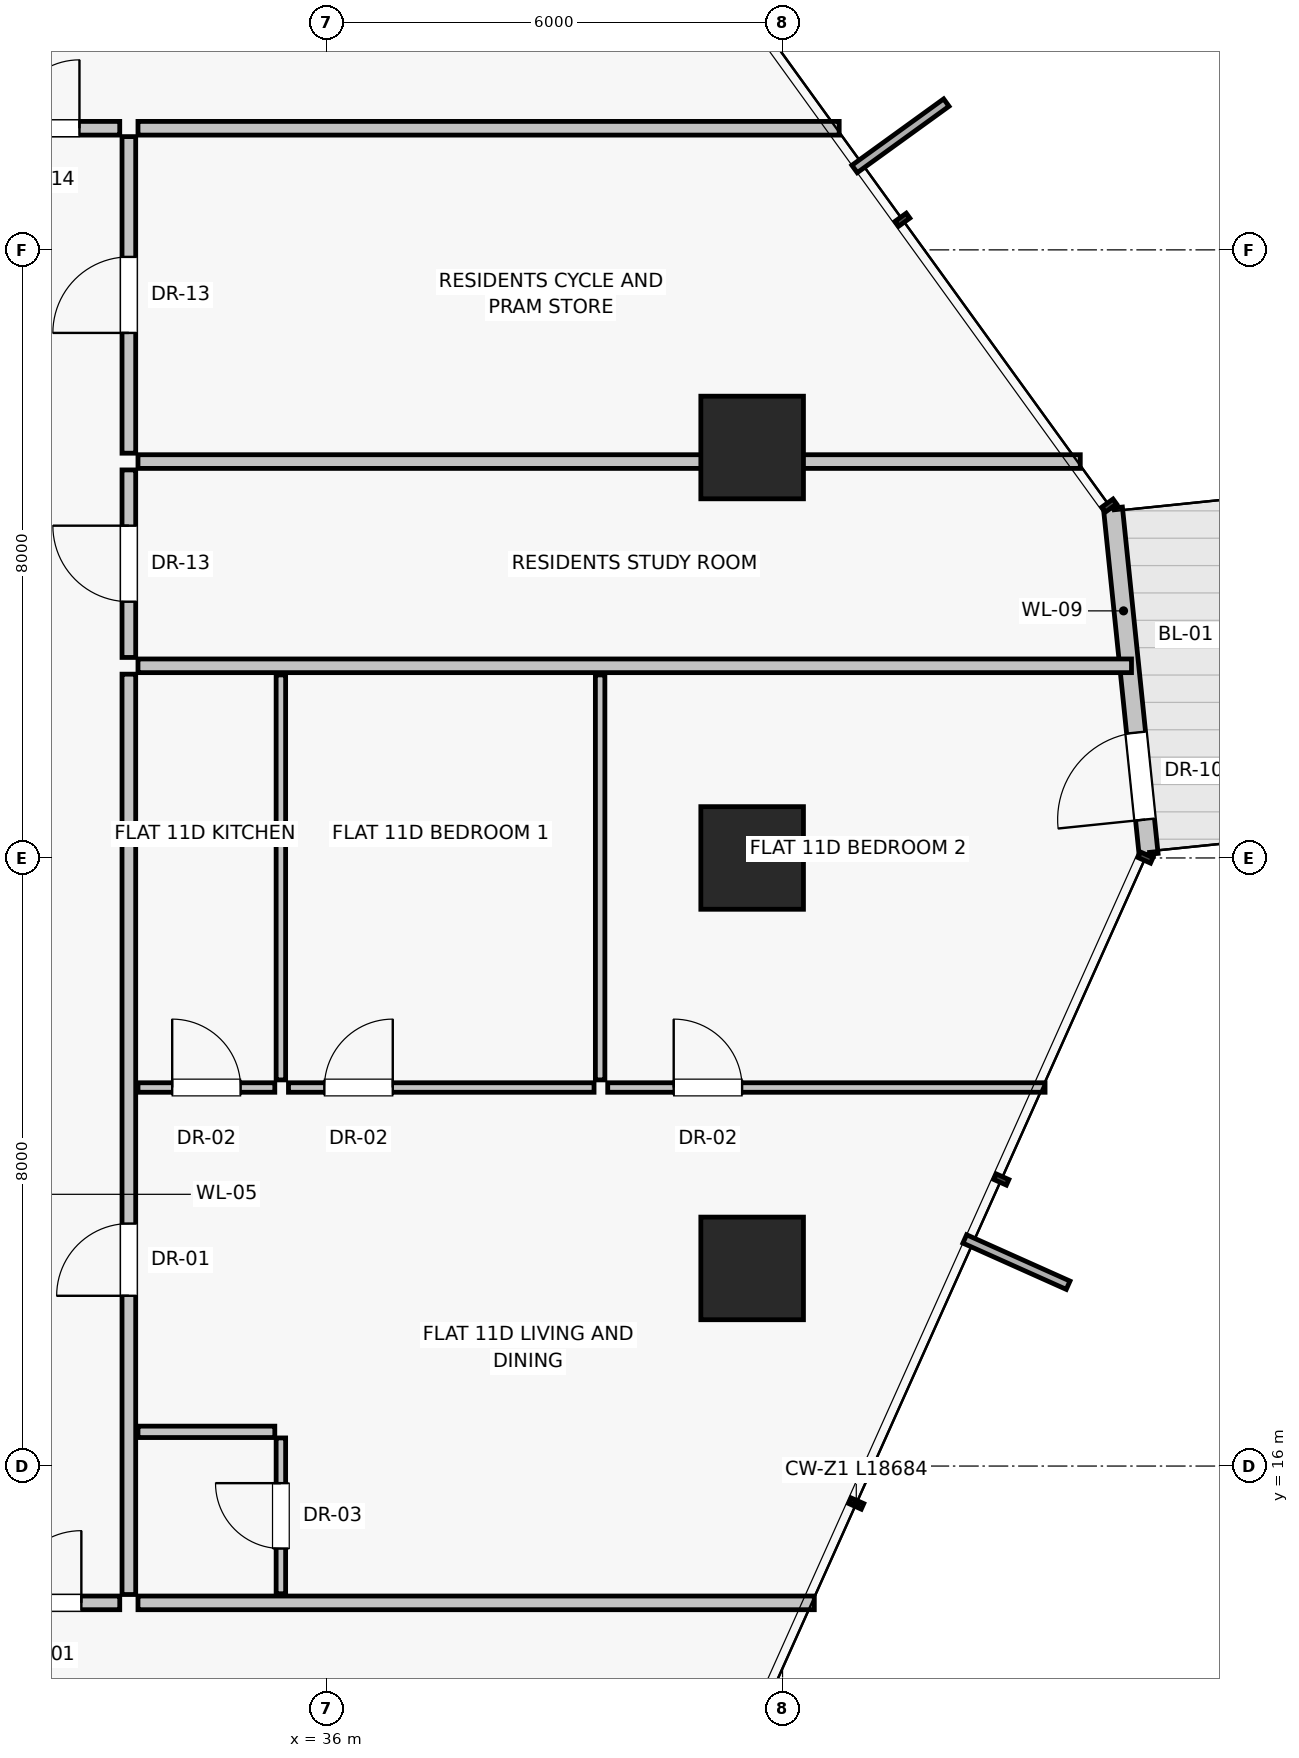
"""IFC4 building model, lengths in metres.
Left out: names, types, materials, properties, quantities, classifications, styles, units other than length and angle.
Written with IfcOpenShell. Run it as: python <this file> out.ifc"""

import sys

from ifc_helpers import new_model, si_unit, direction, frame, frame_2d, origin, origin_2d, place, context, subcontext, project, spatial, rectangle, extrude, source, transform, mapped, element, fill, save


model = new_model("IFC4")
c1 = context("Model", 3, precision=1e-05, world=origin(), true_north=direction((0.0, 1.0)))
c2 = subcontext(c1, "Body", "Model", "MODEL_VIEW")
j1 = project(units=[si_unit("LENGTHUNIT", "METRE"), si_unit("PLANEANGLEUNIT", "RADIAN")], contexts=[c1])
p1 = place(None, origin())
s1 = spatial("IfcSite", under=j1, at=p1, CompositionType="ELEMENT")
p2 = place(p1, origin())
s2 = spatial("IfcBuilding", under=s1, at=p2, CompositionType="ELEMENT")
p3 = place(p2, frame((0.0, 0.0, 43.55)))
s3 = spatial("IfcBuildingStorey", under=s2, at=p3, CompositionType="ELEMENT", Elevation=43.55)
for number, where, z_axis, x_axis in (
    (1, (41.6, 18.6, 0.0), (0.0, 0.0, 1.0), (1.0, 0.0, 0.0)),
    (2, (41.6, 24.0, 0.0), (0.0, 0.0, 1.0), (1.0, 0.0, 0.0)),
    (3, (41.6, 29.4, 0.0), (0.0, 0.0, 1.0), (1.0, 0.0, 0.0)),
):
    element("IfcColumn", number, at=place(p3, frame(where, z_axis=z_axis, x_axis=x_axis)), inside=s3, PredefinedType="COLUMN", context=c2, shape_type="SweptSolid", body=[
        extrude(rectangle(XDim=1.35, YDim=1.35, at=origin_2d()), origin(), (0.0, 0.0, 1.0), 3.25),
    ])
p4 = place(p3, frame((46.816, 24.048, 0.0), z_axis=(0.0, 0.0, 1.0), x_axis=(-0.102453567768, 0.994737787787, 0.0)))
e4 = element("IfcWall", 4, at=p4, inside=s3, PredefinedType="SOLIDWALL", context=c2, shape_type="SweptSolid", body=[
    extrude(rectangle(XDim=4.58, YDim=0.25, at=frame_2d((2.29, 0.0))), origin(), (0.0, 0.0, 1.0), 3.0),
])
p5 = place(p4, frame((0.46, 0.0, 0.0)))
e5 = element("IfcOpeningElement", 5, at=p5, cuts=e4, PredefinedType="OPENING", context=c2, shape_type="SweptSolid", body=[
    extrude(rectangle(XDim=1.15, YDim=2.25, at=frame_2d((0.575, 1.125))), frame((0.0, 0.135, 0.0), z_axis=(0.0, -1.0, 0.0), x_axis=(1.0, 0.0, 0.0)), (0.0, 0.0, 1.0), 0.27),
])
p6 = place(p3, frame((33.52, 14.2, 0.0), z_axis=(0.0, 0.0, 1.0), x_axis=(1.0, 0.0, 0.0)))
e6 = element("IfcWall", 6, at=p6, inside=s3, PredefinedType="PARTITIONING", context=c2, shape_type="SweptSolid", body=[
    extrude(rectangle(XDim=8.898, YDim=0.18, at=frame_2d((4.449, 0.0))), origin(), (0.0, 0.0, 1.0), 3.0),
])
p7 = place(p3, frame((33.52, 33.6, 0.0), z_axis=(0.0, 0.0, 1.0), x_axis=(1.0, 0.0, 0.0)))
e7 = element("IfcWall", 7, at=p7, inside=s3, PredefinedType="PARTITIONING", context=c2, shape_type="SweptSolid", body=[
    extrude(rectangle(XDim=9.225, YDim=0.18, at=frame_2d((4.613, 0.0))), origin(), (0.0, 0.0, 1.0), 3.0),
])
p8 = place(p3, frame((33.4, 14.31, 0.0), z_axis=(0.0, 0.0, 1.0), x_axis=(0.0, 1.0, 0.0)))
e8 = element("IfcWall", 8, at=p8, inside=s3, PredefinedType="PARTITIONING", context=c2, shape_type="SweptSolid", body=[
    extrude(rectangle(XDim=12.108, YDim=0.18, at=frame_2d((6.054, 0.0))), origin(), (0.0, 0.0, 1.0), 3.0),
])
p9 = place(p8, frame((3.93, 0.0, 0.0)))
e9 = element("IfcOpeningElement", 9, at=p9, cuts=e8, PredefinedType="OPENING", context=c2, shape_type="SweptSolid", body=[
    extrude(rectangle(XDim=0.95, YDim=2.02, at=frame_2d((0.475, 1.01))), frame((0.0, 0.1, 0.0), z_axis=(0.0, -1.0, 0.0), x_axis=(1.0, 0.0, 0.0)), (0.0, 0.0, 1.0), 0.2),
])
p10 = place(p3, frame((33.52, 16.45, 0.0), z_axis=(0.0, 0.0, 1.0), x_axis=(1.0, 0.0, 0.0)))
e10 = element("IfcWall", 10, at=p10, inside=s3, PredefinedType="PARTITIONING", context=c2, shape_type="SweptSolid", body=[
    extrude(rectangle(XDim=1.8, YDim=0.15, at=frame_2d((0.9, 0.0))), origin(), (0.0, 0.0, 1.0), 3.0),
])
p11 = place(p3, frame((35.4, 14.32, 0.0), z_axis=(0.0, 0.0, 1.0), x_axis=(0.0, 1.0, 0.0)))
e11 = element("IfcWall", 11, at=p11, inside=s3, PredefinedType="PARTITIONING", context=c2, shape_type="SweptSolid", body=[
    extrude(rectangle(XDim=2.05, YDim=0.125, at=frame_2d((1.025, 0.0))), origin(), (0.0, 0.0, 1.0), 3.0),
])
p12 = place(p11, frame((0.595, 0.0, 0.0)))
e12 = element("IfcOpeningElement", 12, at=p12, cuts=e11, PredefinedType="OPENING", context=c2, shape_type="SweptSolid", body=[
    extrude(rectangle(XDim=0.86, YDim=2.01, at=frame_2d((0.43, 1.005))), frame((0.0, 0.073, 0.0), z_axis=(0.0, -1.0, 0.0), x_axis=(1.0, 0.0, 0.0)), (0.0, 0.0, 1.0), 0.145),
])
p13 = place(p3, frame((33.52, 20.98, 0.0), z_axis=(0.0, 0.0, 1.0), x_axis=(1.0, 0.0, 0.0)))
e13 = element("IfcWall", 13, at=p13, inside=s3, PredefinedType="PARTITIONING", context=c2, shape_type="SweptSolid", body=[
    extrude(rectangle(XDim=1.8, YDim=0.125, at=frame_2d((0.9, 0.0))), origin(), (0.0, 0.0, 1.0), 3.0),
])
p14 = place(p13, frame((0.45, 0.0, 0.0)))
e14 = element("IfcOpeningElement", 14, at=p14, cuts=e13, PredefinedType="OPENING", context=c2, shape_type="SweptSolid", body=[
    extrude(rectangle(XDim=0.9, YDim=2.01, at=frame_2d((0.45, 1.005))), frame((0.0, 0.073, 0.0), z_axis=(0.0, -1.0, 0.0), x_axis=(1.0, 0.0, 0.0)), (0.0, 0.0, 1.0), 0.145),
])
for number, where, z_axis, x_axis in (
    (15, (35.4, 21.08, 0.0), (0.0, 0.0, 1.0), (0.0, 1.0, 0.0)),
    (16, (39.6, 21.08, 0.0), (0.0, 0.0, 1.0), (0.0, 1.0, 0.0)),
):
    element("IfcWall", number, at=place(p3, frame(where, z_axis=z_axis, x_axis=x_axis)), inside=s3, PredefinedType="PARTITIONING", context=c2, shape_type="SweptSolid", body=[
        extrude(rectangle(XDim=5.328, YDim=0.125, at=frame_2d((2.664, 0.0))), origin(), (0.0, 0.0, 1.0), 3.0),
    ])
p15 = place(p3, frame((35.5, 20.98, 0.0), z_axis=(0.0, 0.0, 1.0), x_axis=(1.0, 0.0, 0.0)))
e17 = element("IfcWall", 17, at=p15, inside=s3, PredefinedType="PARTITIONING", context=c2, shape_type="SweptSolid", body=[
    extrude(rectangle(XDim=4.02, YDim=0.125, at=frame_2d((2.01, 0.0))), origin(), (0.0, 0.0, 1.0), 3.0),
])
p16 = place(p15, frame((0.472, 0.0, 0.0)))
e18 = element("IfcOpeningElement", 18, at=p16, cuts=e17, PredefinedType="OPENING", context=c2, shape_type="SweptSolid", body=[
    extrude(rectangle(XDim=0.9, YDim=2.01, at=frame_2d((0.45, 1.005))), frame((0.0, 0.073, 0.0), z_axis=(0.0, -1.0, 0.0), x_axis=(1.0, 0.0, 0.0)), (0.0, 0.0, 1.0), 0.145),
])
p17 = place(p3, frame((39.7, 20.98, 0.0), z_axis=(0.0, 0.0, 1.0), x_axis=(1.0, 0.0, 0.0)))
e19 = element("IfcWall", 19, at=p17, inside=s3, PredefinedType="PARTITIONING", context=c2, shape_type="SweptSolid", body=[
    extrude(rectangle(XDim=5.754, YDim=0.125, at=frame_2d((2.877, 0.0))), origin(), (0.0, 0.0, 1.0), 3.0),
])
p18 = place(p17, frame((0.868, 0.0, 0.0)))
e20 = element("IfcOpeningElement", 20, at=p18, cuts=e19, PredefinedType="OPENING", context=c2, shape_type="SweptSolid", body=[
    extrude(rectangle(XDim=0.9, YDim=2.01, at=frame_2d((0.45, 1.005))), frame((0.0, 0.073, 0.0), z_axis=(0.0, -1.0, 0.0), x_axis=(1.0, 0.0, 0.0)), (0.0, 0.0, 1.0), 0.145),
])
p19 = place(p3, frame((33.52, 26.528, 0.0), z_axis=(0.0, 0.0, 1.0), x_axis=(1.0, 0.0, 0.0)))
e21 = element("IfcWall", 21, at=p19, inside=s3, PredefinedType="PARTITIONING", context=c2, shape_type="SweptSolid", body=[
    extrude(rectangle(XDim=13.071, YDim=0.18, at=frame_2d((6.535, 0.0))), origin(), (0.0, 0.0, 1.0), 3.0),
])
p20 = place(p3, frame((33.4, 26.638, 0.0), z_axis=(0.0, 0.0, 1.0), x_axis=(0.0, 1.0, 0.0)))
e22 = element("IfcWall", 22, at=p20, inside=s3, PredefinedType="PARTITIONING", context=c2, shape_type="SweptSolid", body=[
    extrude(rectangle(XDim=2.467, YDim=0.18, at=frame_2d((1.233, 0.0))), origin(), (0.0, 0.0, 1.0), 3.0),
])
p21 = place(p20, frame((0.733, 0.0, 0.0)))
e23 = element("IfcOpeningElement", 23, at=p21, cuts=e22, PredefinedType="OPENING", context=c2, shape_type="SweptSolid", body=[
    extrude(rectangle(XDim=1.0, YDim=2.01, at=frame_2d((0.5, 1.005))), frame((0.0, 0.1, 0.0), z_axis=(0.0, -1.0, 0.0), x_axis=(1.0, 0.0, 0.0)), (0.0, 0.0, 1.0), 0.2),
])
p22 = place(p3, frame((33.4, 29.325, 0.0), z_axis=(0.0, 0.0, 1.0), x_axis=(0.0, 1.0, 0.0)))
e24 = element("IfcWall", 24, at=p22, inside=s3, PredefinedType="PARTITIONING", context=c2, shape_type="SweptSolid", body=[
    extrude(rectangle(XDim=4.165, YDim=0.18, at=frame_2d((2.083, 0.0))), origin(), (0.0, 0.0, 1.0), 3.0),
])
p23 = place(p22, frame((1.583, 0.0, 0.0)))
e25 = element("IfcOpeningElement", 25, at=p23, cuts=e24, PredefinedType="OPENING", context=c2, shape_type="SweptSolid", body=[
    extrude(rectangle(XDim=1.0, YDim=2.01, at=frame_2d((0.5, 1.005))), frame((0.0, 0.1, 0.0), z_axis=(0.0, -1.0, 0.0), x_axis=(1.0, 0.0, 0.0)), (0.0, 0.0, 1.0), 0.2),
])
p24 = place(p3, frame((33.52, 29.215, 0.0), z_axis=(0.0, 0.0, 1.0), x_axis=(1.0, 0.0, 0.0)))
e26 = element("IfcWall", 26, at=p24, inside=s3, PredefinedType="PARTITIONING", context=c2, shape_type="SweptSolid", body=[
    extrude(rectangle(XDim=12.397, YDim=0.18, at=frame_2d((6.198, 0.0))), origin(), (0.0, 0.0, 1.0), 2.299),
])
p25 = place(p3, frame((31.32, 14.2, 0.0), z_axis=(0.0, 0.0, 1.0), x_axis=(1.0, 0.0, 0.0)))
e27 = element("IfcWall", 27, at=p25, inside=s3, PredefinedType="PARTITIONING", context=c2, shape_type="SweptSolid", body=[
    extrude(rectangle(XDim=1.96, YDim=0.18, at=frame_2d((0.98, 0.0))), origin(), (0.0, 0.0, 1.0), 3.0),
])
p26 = place(p25, frame((0.505, 0.0, 0.0)))
e28 = element("IfcOpeningElement", 28, at=p26, cuts=e27, PredefinedType="OPENING", context=c2, shape_type="SweptSolid", body=[
    extrude(rectangle(XDim=0.95, YDim=2.02, at=frame_2d((0.475, 1.01))), frame((0.0, 0.1, 0.0), z_axis=(0.0, -1.0, 0.0), x_axis=(1.0, 0.0, 0.0)), (0.0, 0.0, 1.0), 0.2),
])
p27 = place(p3, frame((31.32, 33.6, 0.0), z_axis=(0.0, 0.0, 1.0), x_axis=(1.0, 0.0, 0.0)))
e29 = element("IfcWall", 29, at=p27, inside=s3, PredefinedType="PARTITIONING", context=c2, shape_type="SweptSolid", body=[
    extrude(rectangle(XDim=1.96, YDim=0.18, at=frame_2d((0.98, 0.0))), origin(), (0.0, 0.0, 1.0), 3.0),
])
p28 = place(p27, frame((0.53, 0.0, 0.0)))
e30 = element("IfcOpeningElement", 30, at=p28, cuts=e29, PredefinedType="OPENING", context=c2, shape_type="SweptSolid", body=[
    extrude(rectangle(XDim=0.9, YDim=2.01, at=frame_2d((0.45, 1.005))), frame((0.0, 0.1, 0.0), z_axis=(0.0, -1.0, 0.0), x_axis=(1.0, 0.0, 0.0)), (0.0, 0.0, 1.0), 0.2),
])
m1 = source(origin(), c2, "Body", "SweptSolid", [
    extrude(rectangle(XDim=1.15, YDim=2.25, at=frame_2d((0.575, 1.125))), frame((0.0, 0.025, 0.0), z_axis=(0.0, -1.0, 0.0), x_axis=(1.0, 0.0, 0.0)), (0.0, 0.0, 1.0), 0.05),
])
p29 = place(p5, frame((1.15, 0.0, 0.0), z_axis=(0.0, 0.0, 1.0), x_axis=(-1.0, 0.0, 0.0)))
e31 = element("IfcDoor", 31, at=p29, inside=s3, OperationType="SINGLE_SWING_LEFT", PredefinedType="DOOR", context=c2, shape_type="MappedRepresentation", body=[
    mapped(m1, transform((0.0, 0.0, 0.0), scale=1.0)),
])
fill(e5, e31)
m2 = source(origin(), c2, "Body", "SweptSolid", [
    extrude(rectangle(XDim=0.95, YDim=2.02, at=frame_2d((0.475, 1.01))), frame((0.0, 0.025, 0.0), z_axis=(0.0, -1.0, 0.0), x_axis=(1.0, 0.0, 0.0)), (0.0, 0.0, 1.0), 0.05),
])
p30 = place(p9, origin())
e32 = element("IfcDoor", 32, at=p30, inside=s3, OperationType="SINGLE_SWING_LEFT", PredefinedType="DOOR", context=c2, shape_type="MappedRepresentation", body=[
    mapped(m2, transform((0.0, 0.0, 0.0), scale=1.0)),
])
fill(e9, e32)
m3 = source(origin(), c2, "Body", "SweptSolid", [
    extrude(rectangle(XDim=0.86, YDim=2.01, at=frame_2d((0.43, 1.005))), frame((0.0, 0.025, 0.0), z_axis=(0.0, -1.0, 0.0), x_axis=(1.0, 0.0, 0.0)), (0.0, 0.0, 1.0), 0.05),
])
p31 = place(p12, origin())
e33 = element("IfcDoor", 33, at=p31, inside=s3, OperationType="SINGLE_SWING_RIGHT", PredefinedType="DOOR", context=c2, shape_type="MappedRepresentation", body=[
    mapped(m3, transform((0.0, 0.0, 0.0), scale=1.0)),
])
fill(e12, e33)
m4 = source(origin(), c2, "Body", "SweptSolid", [
    extrude(rectangle(XDim=0.9, YDim=2.01, at=frame_2d((0.45, 1.005))), frame((0.0, 0.025, 0.0), z_axis=(0.0, -1.0, 0.0), x_axis=(1.0, 0.0, 0.0)), (0.0, 0.0, 1.0), 0.05),
])
p32 = place(p14, origin())
e34 = element("IfcDoor", 34, at=p32, inside=s3, OperationType="SINGLE_SWING_LEFT", PredefinedType="DOOR", context=c2, shape_type="MappedRepresentation", body=[
    mapped(m4, transform((0.0, 0.0, 0.0), scale=1.0)),
])
fill(e14, e34)
p33 = place(p16, origin())
e35 = element("IfcDoor", 35, at=p33, inside=s3, OperationType="SINGLE_SWING_RIGHT", PredefinedType="DOOR", context=c2, shape_type="MappedRepresentation", body=[
    mapped(m4, transform((0.0, 0.0, 0.0), scale=1.0)),
])
fill(e18, e35)
p34 = place(p18, origin())
e36 = element("IfcDoor", 36, at=p34, inside=s3, OperationType="SINGLE_SWING_LEFT", PredefinedType="DOOR", context=c2, shape_type="MappedRepresentation", body=[
    mapped(m4, transform((0.0, 0.0, 0.0), scale=1.0)),
])
fill(e20, e36)
m5 = source(origin(), c2, "Body", "SweptSolid", [
    extrude(rectangle(XDim=1.0, YDim=2.01, at=frame_2d((0.5, 1.005))), frame((0.0, 0.025, 0.0), z_axis=(0.0, -1.0, 0.0), x_axis=(1.0, 0.0, 0.0)), (0.0, 0.0, 1.0), 0.05),
])
p35 = place(p21, origin())
e37 = element("IfcDoor", 37, at=p35, inside=s3, OperationType="SINGLE_SWING_RIGHT", PredefinedType="DOOR", context=c2, shape_type="MappedRepresentation", body=[
    mapped(m5, transform((0.0, 0.0, 0.0), scale=1.0)),
])
fill(e23, e37)
p36 = place(p23, origin())
e38 = element("IfcDoor", 38, at=p36, inside=s3, OperationType="SINGLE_SWING_LEFT", PredefinedType="DOOR", context=c2, shape_type="MappedRepresentation", body=[
    mapped(m5, transform((0.0, 0.0, 0.0), scale=1.0)),
])
fill(e25, e38)
p37 = place(p26, origin())
e39 = element("IfcDoor", 39, at=p37, inside=s3, OperationType="SINGLE_SWING_RIGHT", PredefinedType="DOOR", context=c2, shape_type="MappedRepresentation", body=[
    mapped(m2, transform((0.0, 0.0, 0.0), scale=1.0)),
])
fill(e28, e39)
p38 = place(p28, origin())
e40 = element("IfcDoor", 40, at=p38, inside=s3, OperationType="SINGLE_SWING_RIGHT", PredefinedType="DOOR", context=c2, shape_type="MappedRepresentation", body=[
    mapped(m4, transform((0.0, 0.0, 0.0), scale=1.0)),
])
fill(e30, e40)
save(model, sys.argv[1])
